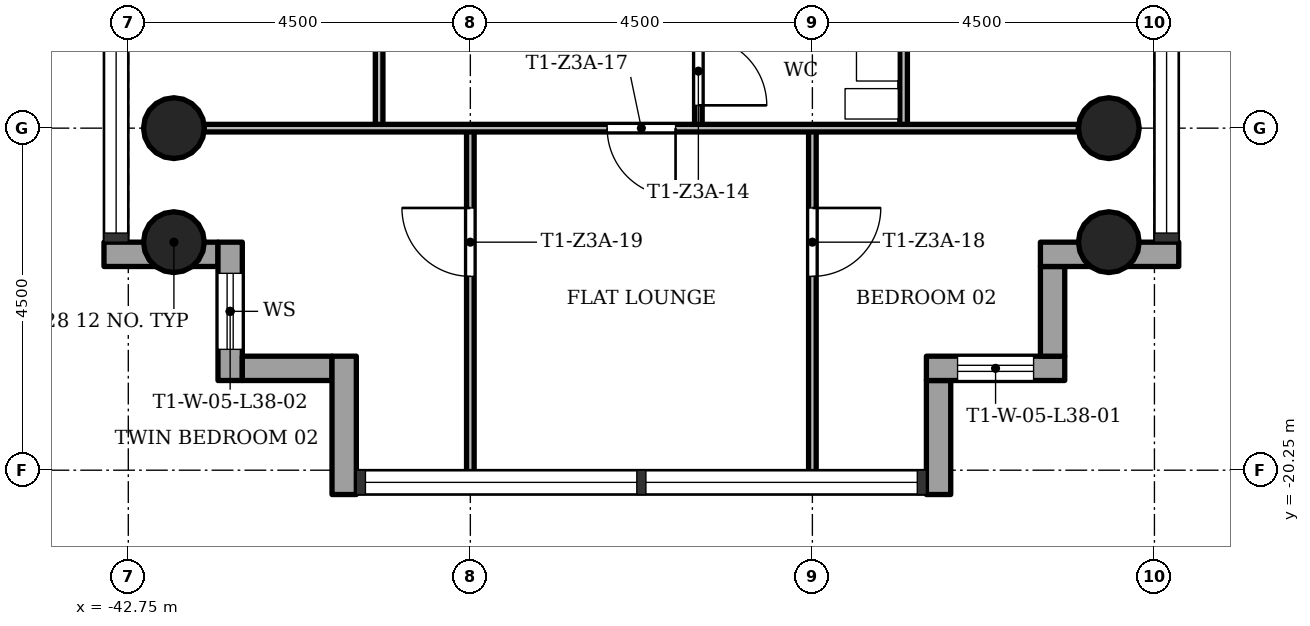
"""IFC4 building model, lengths in metres.
Left out: names, types, materials, properties, quantities, classifications, styles, units other than length and angle.
Written with IfcOpenShell. Run it as: python <this file> out.ifc"""

import sys

from ifc_helpers import new_model, si_unit, direction, frame, frame_2d, origin, origin_2d, place, context, subcontext, project, spatial, rectangle, hollow_circle, extrude, element, fill, save


model = new_model("IFC4")
c1 = context("Model", 3, precision=1e-05, world=origin(), true_north=direction((0.0, 1.0)))
c2 = subcontext(c1, "Body", "Model", "MODEL_VIEW")
j1 = project(units=[si_unit("LENGTHUNIT", "METRE"), si_unit("PLANEANGLEUNIT", "RADIAN")], contexts=[c1])
p1 = place(None, origin())
s1 = spatial("IfcSite", under=j1, at=p1, CompositionType="ELEMENT")
p2 = place(p1, origin())
s2 = spatial("IfcBuilding", under=s1, at=p2, CompositionType="ELEMENT")
p3 = place(p2, frame((0.0, 0.0, 140.5)))
s3 = spatial("IfcBuildingStorey", under=s2, at=p3, CompositionType="ELEMENT", Elevation=140.5)
for number, where, z_axis, x_axis in (
    (1, (-42.15, -15.75, 0.0), (0.0, 0.0, 1.0), (1.0, 0.0, 0.0)),
    (2, (-29.85, -15.75, 0.0), (0.0, 0.0, 1.0), (1.0, 0.0, 0.0)),
    (3, (-42.15, -17.25, 0.0), (0.0, 0.0, 1.0), (1.0, 0.0, 0.0)),
    (4, (-29.85, -17.25, 0.0), (0.0, 0.0, 1.0), (1.0, 0.0, 0.0)),
):
    element("IfcColumn", number, at=place(p3, frame(where, z_axis=z_axis, x_axis=x_axis)), inside=s3, PredefinedType="COLUMN", context=c2, shape_type="SweptSolid", body=[
        extrude(hollow_circle(Radius=0.4, WallThickness=0.028, at=origin_2d()), origin(), (0.0, 0.0, 1.0), 3.4),
    ])
p4 = place(p3, frame((-43.07, -17.41, -0.3), z_axis=(0.0, 0.0, 1.0), x_axis=(1.0, 0.0, 0.0)))
e5 = element("IfcWall", 5, at=p4, inside=s3, PredefinedType="STANDARD", context=c2, shape_type="SweptSolid", body=[
    extrude(rectangle(XDim=1.5, YDim=0.32, at=frame_2d((0.75, 0.0))), origin(), (0.0, 0.0, 1.0), 3.4),
])
p5 = place(p3, frame((-41.41, -17.25, -0.3), z_axis=(0.0, 0.0, 1.0), x_axis=(0.0, -1.0, 0.0)))
e6 = element("IfcWall", 6, at=p5, inside=s3, PredefinedType="STANDARD", context=c2, shape_type="SweptSolid", body=[
    extrude(rectangle(XDim=1.82, YDim=0.32, at=frame_2d((0.91, 0.0))), origin(), (0.0, 0.0, 1.0), 3.4),
])
p6 = place(p5, frame((0.41, 0.0, 1.2)))
e7 = element("IfcOpeningElement", 7, at=p6, cuts=e6, PredefinedType="OPENING", context=c2, shape_type="SweptSolid", body=[
    extrude(rectangle(XDim=1.0, YDim=1.5, at=frame_2d((0.5, 0.75))), frame((0.0, 0.17, 0.0), z_axis=(0.0, -1.0, 0.0), x_axis=(1.0, 0.0, 0.0)), (0.0, 0.0, 1.0), 0.34),
])
p7 = place(p3, frame((-41.25, -18.91, -0.3), z_axis=(0.0, 0.0, 1.0), x_axis=(1.0, 0.0, 0.0)))
e8 = element("IfcWall", 8, at=p7, inside=s3, PredefinedType="STANDARD", context=c2, shape_type="SweptSolid", body=[
    extrude(rectangle(XDim=1.18, YDim=0.32, at=frame_2d((0.59, 0.0))), origin(), (0.0, 0.0, 1.0), 3.4),
])
p8 = place(p3, frame((-39.91, -18.75, -0.3), z_axis=(0.0, 0.0, 1.0), x_axis=(0.0, -1.0, 0.0)))
e9 = element("IfcWall", 9, at=p8, inside=s3, PredefinedType="STANDARD", context=c2, shape_type="SweptSolid", body=[
    extrude(rectangle(XDim=1.82, YDim=0.32, at=frame_2d((0.91, 0.0))), origin(), (0.0, 0.0, 1.0), 3.4),
])
p9 = place(p3, frame((-32.09, -20.57, -0.3), z_axis=(0.0, 0.0, 1.0), x_axis=(0.0, 1.0, 0.0)))
e10 = element("IfcWall", 10, at=p9, inside=s3, PredefinedType="STANDARD", context=c2, shape_type="SweptSolid", body=[
    extrude(rectangle(XDim=1.5, YDim=0.32, at=frame_2d((0.75, 0.0))), origin(), (0.0, 0.0, 1.0), 3.4),
])
p10 = place(p3, frame((-32.25, -18.91, -0.3), z_axis=(0.0, 0.0, 1.0), x_axis=(1.0, 0.0, 0.0)))
e11 = element("IfcWall", 11, at=p10, inside=s3, PredefinedType="STANDARD", context=c2, shape_type="SweptSolid", body=[
    extrude(rectangle(XDim=1.82, YDim=0.32, at=frame_2d((0.91, 0.0))), origin(), (0.0, 0.0, 1.0), 3.4),
])
p11 = place(p10, frame((0.41, 0.0, 1.2)))
e12 = element("IfcOpeningElement", 12, at=p11, cuts=e11, PredefinedType="OPENING", context=c2, shape_type="SweptSolid", body=[
    extrude(rectangle(XDim=1.0, YDim=1.5, at=frame_2d((0.5, 0.75))), frame((0.0, 0.17, 0.0), z_axis=(0.0, -1.0, 0.0), x_axis=(1.0, 0.0, 0.0)), (0.0, 0.0, 1.0), 0.34),
])
p12 = place(p3, frame((-30.59, -18.75, -0.3), z_axis=(0.0, 0.0, 1.0), x_axis=(0.0, 1.0, 0.0)))
e13 = element("IfcWall", 13, at=p12, inside=s3, PredefinedType="STANDARD", context=c2, shape_type="SweptSolid", body=[
    extrude(rectangle(XDim=1.18, YDim=0.32, at=frame_2d((0.59, 0.0))), origin(), (0.0, 0.0, 1.0), 3.4),
])
p13 = place(p3, frame((-30.75, -17.41, -0.3), z_axis=(0.0, 0.0, 1.0), x_axis=(1.0, 0.0, 0.0)))
e14 = element("IfcWall", 14, at=p13, inside=s3, PredefinedType="STANDARD", context=c2, shape_type="SweptSolid", body=[
    extrude(rectangle(XDim=1.82, YDim=0.32, at=frame_2d((0.91, 0.0))), origin(), (0.0, 0.0, 1.0), 3.4),
])
p14 = place(p3, frame((-39.45, -15.75, 0.0), z_axis=(0.0, 0.0, 1.0), x_axis=(0.0, 1.0, 0.0)))
e15 = element("IfcWall", 15, at=p14, inside=s3, PredefinedType="PARTITIONING", context=c2, shape_type="SweptSolid", body=[
    extrude(rectangle(XDim=4.5, YDim=0.1, at=frame_2d((2.25, 0.0))), origin(), (0.0, 0.0, 1.0), 3.0),
])
p15 = place(p14, frame((3.45, 0.0, 0.0)))
e16 = element("IfcOpeningElement", 16, at=p15, cuts=e15, PredefinedType="OPENING", context=c2, shape_type="SweptSolid", body=[
    extrude(rectangle(XDim=0.9, YDim=2.1, at=frame_2d((0.45, 1.05))), frame((0.0, 0.06, 0.0), z_axis=(0.0, -1.0, 0.0), x_axis=(1.0, 0.0, 0.0)), (0.0, 0.0, 1.0), 0.12),
])
p16 = place(p3, frame((-38.25, -20.35, 0.0), z_axis=(0.0, 0.0, 1.0), x_axis=(0.0, 1.0, 0.0)))
e17 = element("IfcWall", 17, at=p16, inside=s3, PredefinedType="PARTITIONING", context=c2, shape_type="SweptSolid", body=[
    extrude(rectangle(XDim=4.6, YDim=0.1, at=frame_2d((2.3, 0.0))), origin(), (0.0, 0.0, 1.0), 3.0),
])
p17 = place(p16, frame((2.65, 0.0, 0.0)))
e18 = element("IfcOpeningElement", 18, at=p17, cuts=e17, PredefinedType="OPENING", context=c2, shape_type="SweptSolid", body=[
    extrude(rectangle(XDim=0.9, YDim=2.1, at=frame_2d((0.45, 1.05))), frame((0.0, 0.06, 0.0), z_axis=(0.0, -1.0, 0.0), x_axis=(1.0, 0.0, 0.0)), (0.0, 0.0, 1.0), 0.12),
])
p18 = place(p3, frame((-35.25, -15.75, 0.0), z_axis=(0.0, 0.0, 1.0), x_axis=(0.0, 1.0, 0.0)))
e19 = element("IfcWall", 19, at=p18, inside=s3, PredefinedType="PARTITIONING", context=c2, shape_type="SweptSolid", body=[
    extrude(rectangle(XDim=3.3, YDim=0.1, at=frame_2d((1.65, 0.0))), origin(), (0.0, 0.0, 1.0), 3.0),
])
p19 = place(p18, frame((1.95, 0.0, 0.0)))
e20 = element("IfcOpeningElement", 20, at=p19, cuts=e19, PredefinedType="OPENING", context=c2, shape_type="SweptSolid", body=[
    extrude(rectangle(XDim=0.9, YDim=2.1, at=frame_2d((0.45, 1.05))), frame((0.0, 0.06, 0.0), z_axis=(0.0, -1.0, 0.0), x_axis=(1.0, 0.0, 0.0)), (0.0, 0.0, 1.0), 0.12),
])
p20 = place(p18, frame((0.3, 0.0, 0.0)))
e21 = element("IfcOpeningElement", 21, at=p20, cuts=e19, PredefinedType="OPENING", context=c2, shape_type="SweptSolid", body=[
    extrude(rectangle(XDim=0.9, YDim=2.1, at=frame_2d((0.45, 1.05))), frame((0.0, 0.06, 0.0), z_axis=(0.0, -1.0, 0.0), x_axis=(1.0, 0.0, 0.0)), (0.0, 0.0, 1.0), 0.12),
])
p21 = place(p3, frame((-33.75, -20.35, 0.0), z_axis=(0.0, 0.0, 1.0), x_axis=(0.0, 1.0, 0.0)))
e22 = element("IfcWall", 22, at=p21, inside=s3, PredefinedType="PARTITIONING", context=c2, shape_type="SweptSolid", body=[
    extrude(rectangle(XDim=4.6, YDim=0.1, at=frame_2d((2.3, 0.0))), origin(), (0.0, 0.0, 1.0), 3.0),
])
p22 = place(p21, frame((2.65, 0.0, 0.0)))
e23 = element("IfcOpeningElement", 23, at=p22, cuts=e22, PredefinedType="OPENING", context=c2, shape_type="SweptSolid", body=[
    extrude(rectangle(XDim=0.9, YDim=2.1, at=frame_2d((0.45, 1.05))), frame((0.0, 0.06, 0.0), z_axis=(0.0, -1.0, 0.0), x_axis=(1.0, 0.0, 0.0)), (0.0, 0.0, 1.0), 0.12),
])
p23 = place(p3, frame((-32.55, -15.75, 0.0), z_axis=(0.0, 0.0, 1.0), x_axis=(0.0, 1.0, 0.0)))
e24 = element("IfcWall", 24, at=p23, inside=s3, PredefinedType="PARTITIONING", context=c2, shape_type="SweptSolid", body=[
    extrude(rectangle(XDim=4.5, YDim=0.1, at=frame_2d((2.25, 0.0))), origin(), (0.0, 0.0, 1.0), 3.0),
])
p24 = place(p23, frame((3.45, 0.0, 0.0)))
e25 = element("IfcOpeningElement", 25, at=p24, cuts=e24, PredefinedType="OPENING", context=c2, shape_type="SweptSolid", body=[
    extrude(rectangle(XDim=0.9, YDim=2.1, at=frame_2d((0.45, 1.05))), frame((0.0, 0.06, 0.0), z_axis=(0.0, -1.0, 0.0), x_axis=(1.0, 0.0, 0.0)), (0.0, 0.0, 1.0), 0.12),
])
p25 = place(p3, frame((-41.75, -15.75, 0.0), z_axis=(0.0, 0.0, 1.0), x_axis=(1.0, 0.0, 0.0)))
e26 = element("IfcWall", 26, at=p25, inside=s3, PredefinedType="PARTITIONING", context=c2, shape_type="SweptSolid", body=[
    extrude(rectangle(XDim=11.5, YDim=0.1, at=frame_2d((5.75, 0.0))), origin(), (0.0, 0.0, 1.0), 3.0),
])
p26 = place(p25, frame((5.3, 0.0, 0.0)))
e27 = element("IfcOpeningElement", 27, at=p26, cuts=e26, PredefinedType="OPENING", context=c2, shape_type="SweptSolid", body=[
    extrude(rectangle(XDim=0.9, YDim=2.1, at=frame_2d((0.45, 1.05))), frame((0.0, 0.06, 0.0), z_axis=(0.0, -1.0, 0.0), x_axis=(1.0, 0.0, 0.0)), (0.0, 0.0, 1.0), 0.12),
])
p27 = place(p20, origin())
e28 = element("IfcDoor", 28, at=p27, inside=s3, OperationType="SINGLE_SWING_LEFT", PredefinedType="DOOR", context=c2, shape_type="SweptSolid", body=[
    extrude(rectangle(XDim=0.9, YDim=2.1, at=frame_2d((0.45, 1.05))), frame((0.0, 0.025, 0.0), z_axis=(0.0, -1.0, 0.0), x_axis=(1.0, 0.0, 0.0)), (0.0, 0.0, 1.0), 0.05),
])
fill(e21, e28)
p28 = place(p26, origin())
e29 = element("IfcDoor", 29, at=p28, inside=s3, OperationType="SINGLE_SWING_RIGHT", PredefinedType="DOOR", context=c2, shape_type="SweptSolid", body=[
    extrude(rectangle(XDim=0.9, YDim=2.1, at=frame_2d((0.45, 1.05))), frame((0.0, 0.025, 0.0), z_axis=(0.0, -1.0, 0.0), x_axis=(1.0, 0.0, 0.0)), (0.0, 0.0, 1.0), 0.05),
])
fill(e27, e29)
p29 = place(p22, origin())
e30 = element("IfcDoor", 30, at=p29, inside=s3, OperationType="SINGLE_SWING_RIGHT", PredefinedType="DOOR", context=c2, shape_type="SweptSolid", body=[
    extrude(rectangle(XDim=0.9, YDim=2.1, at=frame_2d((0.45, 1.05))), frame((0.0, 0.025, 0.0), z_axis=(0.0, -1.0, 0.0), x_axis=(1.0, 0.0, 0.0)), (0.0, 0.0, 1.0), 0.05),
])
fill(e23, e30)
p30 = place(p17, origin())
e31 = element("IfcDoor", 31, at=p30, inside=s3, OperationType="SINGLE_SWING_LEFT", PredefinedType="DOOR", context=c2, shape_type="SweptSolid", body=[
    extrude(rectangle(XDim=0.9, YDim=2.1, at=frame_2d((0.45, 1.05))), frame((0.0, 0.025, 0.0), z_axis=(0.0, -1.0, 0.0), x_axis=(1.0, 0.0, 0.0)), (0.0, 0.0, 1.0), 0.05),
])
fill(e18, e31)
p31 = place(p11, origin())
e32 = element("IfcWindow", 32, at=p31, inside=s3, PartitioningType="SINGLE_PANEL", PredefinedType="WINDOW", context=c2, shape_type="SweptSolid", body=[
    extrude(rectangle(XDim=1.0, YDim=1.5, at=frame_2d((0.5, 0.75))), frame((0.0, 0.03, 0.0), z_axis=(0.0, -1.0, 0.0), x_axis=(1.0, 0.0, 0.0)), (0.0, 0.0, 1.0), 0.06),
])
fill(e12, e32)
p32 = place(p6, origin())
e33 = element("IfcWindow", 33, at=p32, inside=s3, PartitioningType="SINGLE_PANEL", PredefinedType="WINDOW", context=c2, shape_type="SweptSolid", body=[
    extrude(rectangle(XDim=1.0, YDim=1.5, at=frame_2d((0.5, 0.75))), frame((0.0, 0.03, 0.0), z_axis=(0.0, -1.0, 0.0), x_axis=(1.0, 0.0, 0.0)), (0.0, 0.0, 1.0), 0.06),
])
fill(e7, e33)
save(model, sys.argv[1])
